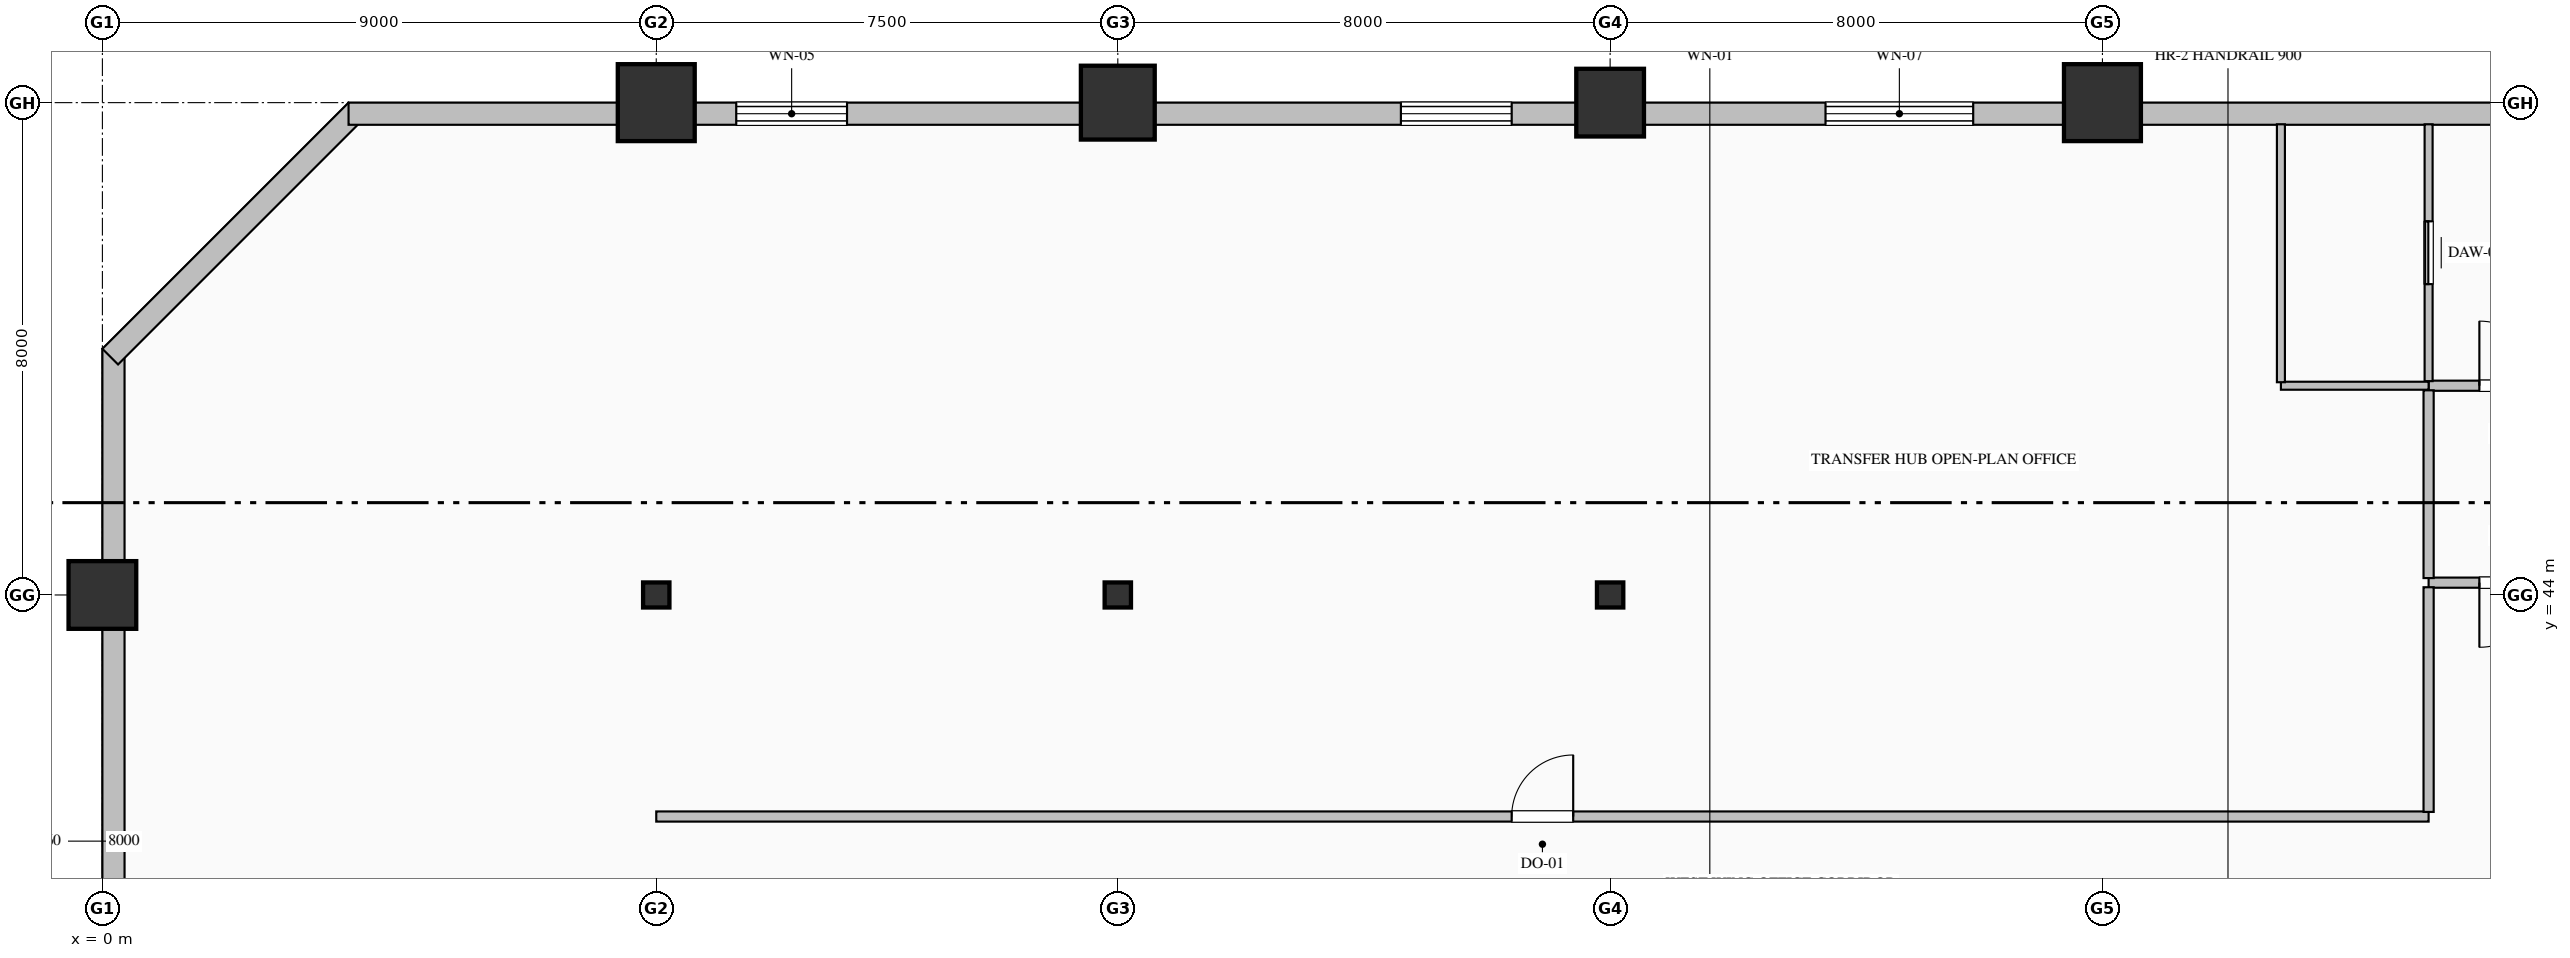
"""IFC4 building model, lengths in metres.
Left out: names, types, materials, properties, quantities, classifications, styles, units other than length and angle.
Written with IfcOpenShell. Run it as: python <this file> out.ifc"""

import sys

from ifc_helpers import new_model, si_unit, direction, frame, frame_2d, origin, origin_2d, place, context, subcontext, project, spatial, rectangle, hollow_rectangle, hollow_circle, i_section, extrude, element, fill, save


model = new_model("IFC4")
c1 = context("Model", 3, precision=1e-05, world=origin(), true_north=direction((0.0, 1.0)))
c2 = subcontext(c1, "Body", "Model", "MODEL_VIEW")
j1 = project(units=[si_unit("LENGTHUNIT", "METRE"), si_unit("PLANEANGLEUNIT", "RADIAN")], contexts=[c1])
p1 = place(None, origin())
s1 = spatial("IfcSite", under=j1, at=p1, CompositionType="ELEMENT")
p2 = place(p1, origin())
s2 = spatial("IfcBuilding", under=s1, at=p2, CompositionType="ELEMENT")
p3 = place(p2, frame((0.0, 0.0, 28.2)))
s3 = spatial("IfcBuildingStorey", under=s2, at=p3, CompositionType="ELEMENT", Elevation=28.2)
p4 = place(p3, frame((0.0, 44.0, 0.0), z_axis=(0.0, 0.0, 1.0), x_axis=(1.0, 0.0, 0.0)))
e1 = element("IfcColumn", 1, at=p4, inside=s3, PredefinedType="COLUMN", context=c2, shape_type="SweptSolid", body=[
    extrude(hollow_rectangle(XDim=1.1, YDim=1.1, WallThickness=0.04, at=origin_2d()), origin(), (0.0, 0.0, 1.0), 4.0),
])
p5 = place(p3, frame((9.0, 44.0, 0.0), z_axis=(0.0, 0.0, 1.0), x_axis=(1.0, 0.0, 0.0)))
e2 = element("IfcColumn", 2, at=p5, inside=s3, PredefinedType="COLUMN", context=c2, shape_type="SweptSolid", body=[
    extrude(i_section(OverallWidth=0.407, OverallDepth=0.428, WebThickness=0.02, FlangeThickness=0.035, FilletRadius=0.022, at=origin_2d()), origin(), (0.0, 0.0, 1.0), 4.0),
])
p6 = place(p3, frame((9.0, 52.0, 0.0), z_axis=(0.0, 0.0, 1.0), x_axis=(1.0, 0.0, 0.0)))
e3 = element("IfcColumn", 3, at=p6, inside=s3, PredefinedType="COLUMN", context=c2, shape_type="SweptSolid", body=[
    extrude(hollow_rectangle(XDim=1.25, YDim=1.25, WallThickness=0.045, at=origin_2d()), origin(), (0.0, 0.0, 1.0), 4.0),
])
p7 = place(p3, frame((16.5, 44.0, 0.0), z_axis=(0.0, 0.0, 1.0), x_axis=(1.0, 0.0, 0.0)))
e4 = element("IfcColumn", 4, at=p7, inside=s3, PredefinedType="COLUMN", context=c2, shape_type="SweptSolid", body=[
    extrude(i_section(OverallWidth=0.407, OverallDepth=0.428, WebThickness=0.02, FlangeThickness=0.035, FilletRadius=0.022, at=origin_2d()), origin(), (0.0, 0.0, 1.0), 4.0),
])
p8 = place(p3, frame((16.5, 52.0, 0.0), z_axis=(0.0, 0.0, 1.0), x_axis=(1.0, 0.0, 0.0)))
e5 = element("IfcColumn", 5, at=p8, inside=s3, PredefinedType="COLUMN", context=c2, shape_type="SweptSolid", body=[
    extrude(hollow_circle(Radius=0.6, WallThickness=0.04, at=origin_2d()), origin(), (0.0, 0.0, 1.0), 4.0),
])
p9 = place(p3, frame((24.5, 44.0, 0.0), z_axis=(0.0, 0.0, 1.0), x_axis=(1.0, 0.0, 0.0)))
e6 = element("IfcColumn", 6, at=p9, inside=s3, PredefinedType="COLUMN", context=c2, shape_type="SweptSolid", body=[
    extrude(i_section(OverallWidth=0.407, OverallDepth=0.428, WebThickness=0.02, FlangeThickness=0.035, FilletRadius=0.022, at=origin_2d()), origin(), (0.0, 0.0, 1.0), 4.0),
])
p10 = place(p3, frame((24.5, 52.0, 0.0), z_axis=(0.0, 0.0, 1.0), x_axis=(1.0, 0.0, 0.0)))
e7 = element("IfcColumn", 7, at=p10, inside=s3, PredefinedType="COLUMN", context=c2, shape_type="SweptSolid", body=[
    extrude(hollow_rectangle(XDim=1.1, YDim=1.1, WallThickness=0.04, at=origin_2d()), origin(), (0.0, 0.0, 1.0), 4.0),
])
p11 = place(p3, frame((32.5, 52.0, 0.0), z_axis=(0.0, 0.0, 1.0), x_axis=(1.0, 0.0, 0.0)))
e8 = element("IfcColumn", 8, at=p11, inside=s3, PredefinedType="COLUMN", context=c2, shape_type="SweptSolid", body=[
    extrude(hollow_rectangle(XDim=1.25, YDim=1.25, WallThickness=0.045, at=origin_2d()), origin(), (0.0, 0.0, 1.0), 4.0),
])
p12 = place(p3, frame((0.18, 32.0, 0.0), z_axis=(0.0, 0.0, 1.0), x_axis=(0.0, 1.0, 0.0)))
e9 = element("IfcWall", 9, at=p12, inside=s3, PredefinedType="SOLIDWALL", context=c2, shape_type="SweptSolid", body=[
    extrude(rectangle(XDim=16.0, YDim=0.36, at=frame_2d((8.0, 0.0))), origin(), (0.0, 0.0, 1.0), 3.25),
])
p13 = place(p3, frame((0.127, 47.873, 0.0), z_axis=(0.0, 0.0, 1.0), x_axis=(0.707106781187, 0.707106781187, 0.0)))
e10 = element("IfcWall", 10, at=p13, inside=s3, PredefinedType="SOLIDWALL", context=c2, shape_type="SweptSolid", body=[
    extrude(rectangle(XDim=5.657, YDim=0.36, at=frame_2d((2.828, 0.0))), origin(), (0.0, 0.0, 1.0), 3.75),
])
p14 = place(p3, frame((4.0, 51.82, 0.0), z_axis=(0.0, 0.0, 1.0), x_axis=(1.0, 0.0, 0.0)))
e11 = element("IfcWall", 11, at=p14, inside=s3, PredefinedType="SOLIDWALL", context=c2, shape_type="SweptSolid", body=[
    extrude(rectangle(XDim=36.52, YDim=0.36, at=frame_2d((18.26, 0.0))), origin(), (0.0, 0.0, 1.0), 3.25),
])
p15 = place(p14, frame((6.3, 0.0, 0.85)))
e12 = element("IfcOpeningElement", 12, at=p15, cuts=e11, PredefinedType="OPENING", context=c2, shape_type="SweptSolid", body=[
    extrude(rectangle(XDim=1.8, YDim=2.05, at=frame_2d((0.9, 1.025))), frame((0.0, 0.19, 0.0), z_axis=(0.0, -1.0, 0.0), x_axis=(1.0, 0.0, 0.0)), (0.0, 0.0, 1.0), 0.38),
])
p16 = place(p14, frame((17.1, 0.0, 0.85)))
e13 = element("IfcOpeningElement", 13, at=p16, cuts=e11, PredefinedType="OPENING", context=c2, shape_type="SweptSolid", body=[
    extrude(rectangle(XDim=1.8, YDim=2.05, at=frame_2d((0.9, 1.025))), frame((0.0, 0.19, 0.0), z_axis=(0.0, -1.0, 0.0), x_axis=(1.0, 0.0, 0.0)), (0.0, 0.0, 1.0), 0.38),
])
p17 = place(p14, frame((24.0, 0.0, 0.8)))
e14 = element("IfcOpeningElement", 14, at=p17, cuts=e11, PredefinedType="OPENING", context=c2, shape_type="SweptSolid", body=[
    extrude(rectangle(XDim=2.4, YDim=2.15, at=frame_2d((1.2, 1.075))), frame((0.0, 0.19, 0.0), z_axis=(0.0, -1.0, 0.0), x_axis=(1.0, 0.0, 0.0)), (0.0, 0.0, 1.0), 0.38),
])
p18 = place(p3, frame((37.8, 47.4, 0.0), z_axis=(0.0, 0.0, 1.0), x_axis=(1.0, 0.0, 0.0)))
e15 = element("IfcWall", 15, at=p18, inside=s3, PredefinedType="PARTITIONING", context=c2, shape_type="SweptSolid", body=[
    extrude(rectangle(XDim=2.7, YDim=0.165, at=frame_2d((1.35, 0.0))), origin(), (0.0, 0.0, 1.0), 3.75),
])
p19 = place(p18, frame((0.825, 0.0, 0.0)))
e16 = element("IfcOpeningElement", 16, at=p19, cuts=e15, PredefinedType="OPENING", context=c2, shape_type="SweptSolid", body=[
    extrude(rectangle(XDim=1.05, YDim=2.15, at=frame_2d((0.525, 1.075))), frame((0.0, 0.093, 0.0), z_axis=(0.0, -1.0, 0.0), x_axis=(1.0, 0.0, 0.0)), (0.0, 0.0, 1.0), 0.185),
])
p20 = place(p3, frame((40.5, 44.2, 0.0), z_axis=(0.0, 0.0, 1.0), x_axis=(-1.0, 0.0, 0.0)))
e17 = element("IfcWall", 17, at=p20, inside=s3, PredefinedType="PARTITIONING", context=c2, shape_type="SweptSolid", body=[
    extrude(rectangle(XDim=2.7, YDim=0.165, at=frame_2d((1.35, 0.0))), origin(), (0.0, 0.0, 1.0), 3.75),
])
p21 = place(p20, frame((0.825, 0.0, 0.0)))
e18 = element("IfcOpeningElement", 18, at=p21, cuts=e17, PredefinedType="OPENING", context=c2, shape_type="SweptSolid", body=[
    extrude(rectangle(XDim=1.05, YDim=2.15, at=frame_2d((0.525, 1.075))), frame((0.0, 0.093, 0.0), z_axis=(0.0, -1.0, 0.0), x_axis=(1.0, 0.0, 0.0)), (0.0, 0.0, 1.0), 0.185),
])
p22 = place(p3, frame((37.8, 44.274, 0.0), z_axis=(0.0, 0.0, 1.0), x_axis=(0.0, 1.0, 0.0)))
e19 = element("IfcWall", 19, at=p22, inside=s3, PredefinedType="PARTITIONING", context=c2, shape_type="SweptSolid", body=[
    extrude(rectangle(XDim=3.051, YDim=0.165, at=frame_2d((1.525, 0.0))), origin(), (0.0, 0.0, 1.0), 3.75),
])
p23 = place(p3, frame((37.8, 47.475, 0.0), z_axis=(0.0, 0.0, 1.0), x_axis=(0.0, 1.0, 0.0)))
e20 = element("IfcWall", 20, at=p23, inside=s3, PredefinedType="PARTITIONING", context=c2, shape_type="SweptSolid", body=[
    extrude(rectangle(XDim=4.173, YDim=0.13, at=frame_2d((2.087, 0.0))), origin(), (0.0, 0.0, 1.0), 3.75),
])
p24 = place(p23, frame((1.577, 0.0, 0.0)))
e21 = element("IfcOpeningElement", 21, at=p24, cuts=e20, PredefinedType="OPENING", context=c2, shape_type="SweptSolid", body=[
    extrude(rectangle(XDim=1.02, YDim=2.15, at=frame_2d((0.51, 1.075))), frame((0.0, 0.075, 0.0), z_axis=(0.0, -1.0, 0.0), x_axis=(1.0, 0.0, 0.0)), (0.0, 0.0, 1.0), 0.15),
])
p25 = place(p3, frame((37.8, 47.4, 0.0), z_axis=(0.0, 0.0, 1.0), x_axis=(-1.0, 0.0, 0.0)))
e22 = element("IfcWall", 22, at=p25, inside=s3, PredefinedType="PARTITIONING", context=c2, shape_type="SweptSolid", body=[
    extrude(rectangle(XDim=2.4, YDim=0.13, at=frame_2d((1.2, 0.0))), origin(), (0.0, 0.0, 1.0), 3.75),
])
p26 = place(p3, frame((35.4, 47.457, 0.0), z_axis=(0.0, 0.0, 1.0), x_axis=(0.0, 1.0, 0.0)))
e23 = element("IfcWall", 23, at=p26, inside=s3, PredefinedType="PARTITIONING", context=c2, shape_type="SweptSolid", body=[
    extrude(rectangle(XDim=4.191, YDim=0.13, at=frame_2d((2.095, 0.0))), origin(), (0.0, 0.0, 1.0), 3.75),
])
p27 = place(p3, frame((9.0, 40.4, 0.0), z_axis=(0.0, 0.0, 1.0), x_axis=(1.0, 0.0, 0.0)))
e24 = element("IfcWall", 24, at=p27, inside=s3, PredefinedType="PARTITIONING", context=c2, shape_type="SweptSolid", body=[
    extrude(rectangle(XDim=28.8, YDim=0.165, at=frame_2d((14.4, 0.0))), origin(), (0.0, 0.0, 1.0), 3.75),
])
p28 = place(p27, frame((13.9, 0.0, 0.0)))
e25 = element("IfcOpeningElement", 25, at=p28, cuts=e24, PredefinedType="OPENING", context=c2, shape_type="SweptSolid", body=[
    extrude(rectangle(XDim=1.0, YDim=2.15, at=frame_2d((0.5, 1.075))), frame((0.0, 0.093, 0.0), z_axis=(0.0, -1.0, 0.0), x_axis=(1.0, 0.0, 0.0)), (0.0, 0.0, 1.0), 0.185),
])
p29 = place(p3, frame((37.8, 40.475, 0.0), z_axis=(0.0, 0.0, 1.0), x_axis=(0.0, 1.0, 0.0)))
e26 = element("IfcWall", 26, at=p29, inside=s3, PredefinedType="PARTITIONING", context=c2, shape_type="SweptSolid", body=[
    extrude(rectangle(XDim=3.651, YDim=0.165, at=frame_2d((1.825, 0.0))), origin(), (0.0, 0.0, 1.0), 3.75),
])
p30 = place(p15, origin())
e27 = element("IfcWindow", 27, at=p30, inside=s3, PartitioningType="TRIPLE_PANEL_VERTICAL", PredefinedType="WINDOW", context=c2, shape_type="SweptSolid", body=[
    extrude(rectangle(XDim=1.8, YDim=2.05, at=frame_2d((0.9, 1.025))), frame((0.0, 0.15, 0.0), z_axis=(0.0, -1.0, 0.0), x_axis=(1.0, 0.0, 0.0)), (0.0, 0.0, 1.0), 0.06),
])
fill(e12, e27)
p31 = place(p16, origin())
e28 = element("IfcWindow", 28, at=p31, inside=s3, PartitioningType="TRIPLE_PANEL_VERTICAL", PredefinedType="WINDOW", context=c2, shape_type="SweptSolid", body=[
    extrude(rectangle(XDim=1.8, YDim=2.05, at=frame_2d((0.9, 1.025))), frame((0.0, 0.15, 0.0), z_axis=(0.0, -1.0, 0.0), x_axis=(1.0, 0.0, 0.0)), (0.0, 0.0, 1.0), 0.06),
])
fill(e13, e28)
p32 = place(p17, origin())
e29 = element("IfcWindow", 29, at=p32, inside=s3, PartitioningType="TRIPLE_PANEL_VERTICAL", PredefinedType="WINDOW", context=c2, shape_type="SweptSolid", body=[
    extrude(rectangle(XDim=2.4, YDim=2.15, at=frame_2d((1.2, 1.075))), frame((0.0, 0.15, 0.0), z_axis=(0.0, -1.0, 0.0), x_axis=(1.0, 0.0, 0.0)), (0.0, 0.0, 1.0), 0.06),
])
fill(e14, e29)
p33 = place(p19, origin())
e30 = element("IfcDoor", 30, at=p33, inside=s3, OperationType="SINGLE_SWING_LEFT", PredefinedType="DOOR", context=c2, shape_type="SweptSolid", body=[
    extrude(rectangle(XDim=1.05, YDim=2.15, at=frame_2d((0.525, 1.075))), frame((0.0, 0.025, 0.0), z_axis=(0.0, -1.0, 0.0), x_axis=(1.0, 0.0, 0.0)), (0.0, 0.0, 1.0), 0.05),
])
fill(e16, e30)
p34 = place(p21, origin())
e31 = element("IfcDoor", 31, at=p34, inside=s3, OperationType="SINGLE_SWING_RIGHT", PredefinedType="DOOR", context=c2, shape_type="SweptSolid", body=[
    extrude(rectangle(XDim=1.05, YDim=2.15, at=frame_2d((0.525, 1.075))), frame((0.0, 0.025, 0.0), z_axis=(0.0, -1.0, 0.0), x_axis=(1.0, 0.0, 0.0)), (0.0, 0.0, 1.0), 0.05),
])
fill(e18, e31)
p35 = place(p24, origin())
e32 = element("IfcDoor", 32, at=p35, inside=s3, OperationType="SLIDING_TO_LEFT", PredefinedType="DOOR", context=c2, shape_type="SweptSolid", body=[
    extrude(rectangle(XDim=1.02, YDim=2.15, at=frame_2d((0.51, 1.075))), frame((0.0, 0.025, 0.0), z_axis=(0.0, -1.0, 0.0), x_axis=(1.0, 0.0, 0.0)), (0.0, 0.0, 1.0), 0.05),
])
fill(e21, e32)
p36 = place(p28, origin())
e33 = element("IfcDoor", 33, at=p36, inside=s3, OperationType="SINGLE_SWING_RIGHT", PredefinedType="DOOR", context=c2, shape_type="SweptSolid", body=[
    extrude(rectangle(XDim=1.0, YDim=2.15, at=frame_2d((0.5, 1.075))), frame((0.0, 0.025, 0.0), z_axis=(0.0, -1.0, 0.0), x_axis=(1.0, 0.0, 0.0)), (0.0, 0.0, 1.0), 0.05),
])
fill(e25, e33)
save(model, sys.argv[1])
